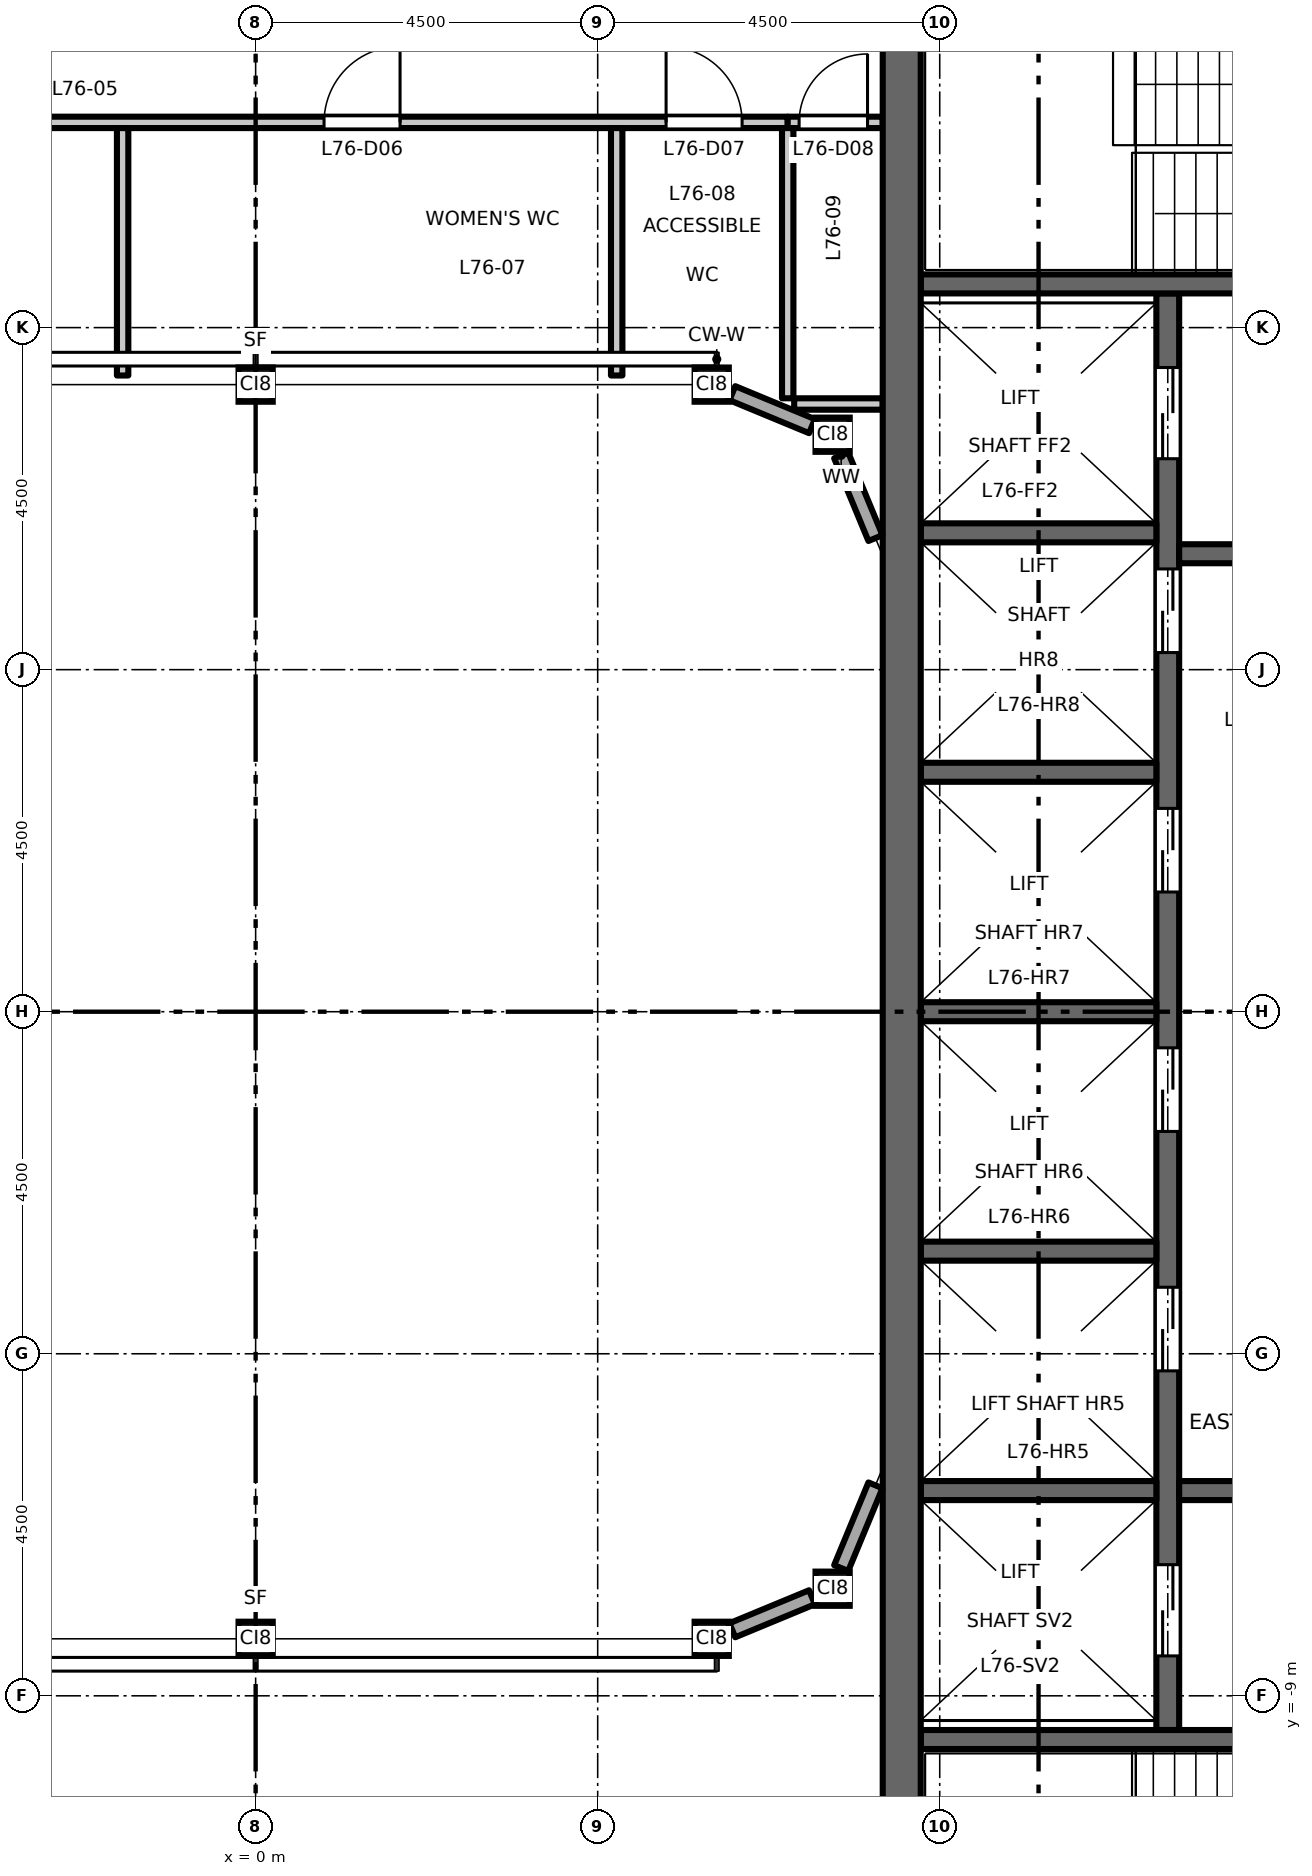
"""IFC4 building model, lengths in metres.
Left out: names, types, materials, properties, quantities, classifications, styles, units other than length and angle.
Written with IfcOpenShell. Run it as: python <this file> out.ifc"""

import sys

from ifc_helpers import new_model, si_unit, direction, frame, frame_2d, origin, origin_2d, place, context, subcontext, project, spatial, rectangle, hollow_rectangle, extrude, element, fill, save


model = new_model("IFC4")
c1 = context("Model", 3, precision=1e-05, world=origin(), true_north=direction((0.0, 1.0)))
c2 = subcontext(c1, "Body", "Model", "MODEL_VIEW")
j1 = project(units=[si_unit("LENGTHUNIT", "METRE"), si_unit("PLANEANGLEUNIT", "RADIAN")], contexts=[c1])
p1 = place(None, origin())
s1 = spatial("IfcSite", under=j1, at=p1, CompositionType="ELEMENT")
p2 = place(p1, origin())
s2 = spatial("IfcBuilding", under=s1, at=p2, CompositionType="ELEMENT")
p3 = place(p2, frame((0.0, 0.0, 353.2)))
s3 = spatial("IfcBuildingStorey", under=s2, at=p3, CompositionType="ELEMENT", Elevation=353.2)
for number, where, z_axis, x_axis in (
    (1, (0.0, -8.25, 0.0), (0.0, 0.0, 1.0), (1.0, 0.0, 0.0)),
    (2, (6.0, -8.25, 0.0), (0.0, 0.0, 1.0), (1.0, 0.0, 0.0)),
    (3, (7.591, -7.591, 0.0), (0.0, 0.0, 1.0), (1.0, 0.0, 0.0)),
    (4, (0.0, 8.25, 0.0), (0.0, 0.0, 1.0), (1.0, 0.0, 0.0)),
    (5, (6.0, 8.25, 0.0), (0.0, 0.0, 1.0), (1.0, 0.0, 0.0)),
    (6, (7.591, 7.591, 0.0), (0.0, 0.0, 1.0), (1.0, 0.0, 0.0)),
):
    element("IfcColumn", number, at=place(p3, frame(where, z_axis=z_axis, x_axis=x_axis)), inside=s3, PredefinedType="COLUMN", context=c2, shape_type="SweptSolid", body=[
        extrude(hollow_rectangle(XDim=0.45, YDim=0.45, WallThickness=0.022, at=origin_2d()), origin(), (0.0, 0.0, 1.0), 5.0),
    ])
p4 = place(p3, frame((12.0, -9.45, 0.0), z_axis=(0.0, 0.0, 1.0), x_axis=(0.0, 1.0, 0.0)))
e7 = element("IfcWall", 7, at=p4, inside=s3, PredefinedType="SHEAR", context=c2, shape_type="SweptSolid", body=[
    extrude(rectangle(XDim=18.9, YDim=0.3, at=frame_2d((9.45, 0.0))), origin(), (0.0, 0.0, 1.0), 4.8),
])
p5 = place(p4, frame((4.725, 0.0, 0.0)))
e8 = element("IfcOpeningElement", 8, at=p5, cuts=e7, PredefinedType="OPENING", context=c2, shape_type="SweptSolid", body=[
    extrude(rectangle(XDim=1.1, YDim=2.1, at=frame_2d((0.55, 1.05))), frame((0.0, 0.16, 0.0), z_axis=(0.0, -1.0, 0.0), x_axis=(1.0, 0.0, 0.0)), (0.0, 0.0, 1.0), 0.32),
])
p6 = place(p4, frame((7.875, 0.0, 0.0)))
e9 = element("IfcOpeningElement", 9, at=p6, cuts=e7, PredefinedType="OPENING", context=c2, shape_type="SweptSolid", body=[
    extrude(rectangle(XDim=1.1, YDim=2.1, at=frame_2d((0.55, 1.05))), frame((0.0, 0.16, 0.0), z_axis=(0.0, -1.0, 0.0), x_axis=(1.0, 0.0, 0.0)), (0.0, 0.0, 1.0), 0.32),
])
p7 = place(p4, frame((11.025, 0.0, 0.0)))
e10 = element("IfcOpeningElement", 10, at=p7, cuts=e7, PredefinedType="OPENING", context=c2, shape_type="SweptSolid", body=[
    extrude(rectangle(XDim=1.1, YDim=2.1, at=frame_2d((0.55, 1.05))), frame((0.0, 0.16, 0.0), z_axis=(0.0, -1.0, 0.0), x_axis=(1.0, 0.0, 0.0)), (0.0, 0.0, 1.0), 0.32),
])
p8 = place(p4, frame((14.175, 0.0, 0.0)))
e11 = element("IfcOpeningElement", 11, at=p8, cuts=e7, PredefinedType="OPENING", context=c2, shape_type="SweptSolid", body=[
    extrude(rectangle(XDim=1.1, YDim=2.1, at=frame_2d((0.55, 1.05))), frame((0.0, 0.16, 0.0), z_axis=(0.0, -1.0, 0.0), x_axis=(1.0, 0.0, 0.0)), (0.0, 0.0, 1.0), 0.32),
])
p9 = place(p4, frame((16.725, 0.0, 0.0)))
e12 = element("IfcOpeningElement", 12, at=p9, cuts=e7, PredefinedType="OPENING", context=c2, shape_type="SweptSolid", body=[
    extrude(rectangle(XDim=1.2, YDim=2.1, at=frame_2d((0.6, 1.05))), frame((0.0, 0.16, 0.0), z_axis=(0.0, -1.0, 0.0), x_axis=(1.0, 0.0, 0.0)), (0.0, 0.0, 1.0), 0.32),
])
p10 = place(p4, frame((0.975, 0.0, 0.0)))
e13 = element("IfcOpeningElement", 13, at=p10, cuts=e7, PredefinedType="OPENING", context=c2, shape_type="SweptSolid", body=[
    extrude(rectangle(XDim=1.2, YDim=2.1, at=frame_2d((0.6, 1.05))), frame((0.0, 0.16, 0.0), z_axis=(0.0, -1.0, 0.0), x_axis=(1.0, 0.0, 0.0)), (0.0, 0.0, 1.0), 0.32),
])
p11 = place(p3, frame((12.15, 6.025, 0.0), z_axis=(0.0, 0.0, 1.0), x_axis=(1.0, 0.0, 0.0)))
e14 = element("IfcWall", 14, at=p11, inside=s3, PredefinedType="SHEAR", context=c2, shape_type="SweptSolid", body=[
    extrude(rectangle(XDim=4.6, YDim=0.25, at=frame_2d((2.3, 0.0))), origin(), (0.0, 0.0, 1.0), 4.8),
])
p12 = place(p11, frame((1.8, 0.0, 0.0)))
e15 = element("IfcOpeningElement", 15, at=p12, cuts=e14, PredefinedType="OPENING", context=c2, shape_type="SweptSolid", body=[
    extrude(rectangle(XDim=1.0, YDim=2.1, at=frame_2d((0.5, 1.05))), frame((0.0, 0.135, 0.0), z_axis=(0.0, -1.0, 0.0), x_axis=(1.0, 0.0, 0.0)), (0.0, 0.0, 1.0), 0.27),
])
p13 = place(p3, frame((12.15, -6.3, 0.0), z_axis=(0.0, 0.0, 1.0), x_axis=(1.0, 0.0, 0.0)))
e16 = element("IfcWall", 16, at=p13, inside=s3, PredefinedType="SHEAR", context=c2, shape_type="SweptSolid", body=[
    extrude(rectangle(XDim=4.6, YDim=0.25, at=frame_2d((2.3, 0.0))), origin(), (0.0, 0.0, 1.0), 4.8),
])
p14 = place(p13, frame((1.8, 0.0, 0.0)))
e17 = element("IfcOpeningElement", 17, at=p14, cuts=e16, PredefinedType="OPENING", context=c2, shape_type="SweptSolid", body=[
    extrude(rectangle(XDim=1.0, YDim=2.1, at=frame_2d((0.5, 1.05))), frame((0.0, 0.135, 0.0), z_axis=(0.0, -1.0, 0.0), x_axis=(1.0, 0.0, 0.0)), (0.0, 0.0, 1.0), 0.27),
])
for number, where, z_axis, x_axis in (
    (18, (8.75, 0.0, 0.0), (0.0, 0.0, 1.0), (1.0, 0.0, 0.0)),
    (19, (8.75, 3.15, 0.0), (0.0, 0.0, 1.0), (1.0, 0.0, 0.0)),
    (20, (8.75, 6.3, 0.0), (0.0, 0.0, 1.0), (1.0, 0.0, 0.0)),
    (21, (8.75, -3.15, 0.0), (0.0, 0.0, 1.0), (1.0, 0.0, 0.0)),
    (22, (8.75, -6.3, 0.0), (0.0, 0.0, 1.0), (1.0, 0.0, 0.0)),
):
    element("IfcWall", number, at=place(p3, frame(where, z_axis=z_axis, x_axis=x_axis)), inside=s3, PredefinedType="SHEAR", context=c2, shape_type="SweptSolid", body=[
        extrude(rectangle(XDim=3.1, YDim=0.25, at=frame_2d((1.55, 0.0))), origin(), (0.0, 0.0, 1.0), 4.8),
    ])
p15 = place(p3, frame((8.75, 9.575, 0.0), z_axis=(0.0, 0.0, 1.0), x_axis=(1.0, 0.0, 0.0)))
e23 = element("IfcWall", 23, at=p15, inside=s3, PredefinedType="SHEAR", context=c2, shape_type="SweptSolid", body=[
    extrude(rectangle(XDim=8.0, YDim=0.25, at=frame_2d((4.0, 0.0))), origin(), (0.0, 0.0, 1.0), 4.8),
])
p16 = place(p15, frame((6.65, 0.0, 0.0)))
e24 = element("IfcOpeningElement", 24, at=p16, cuts=e23, PredefinedType="OPENING", context=c2, shape_type="SweptSolid", body=[
    extrude(rectangle(XDim=1.1, YDim=2.1, at=frame_2d((0.55, 1.05))), frame((0.0, 0.135, 0.0), z_axis=(0.0, -1.0, 0.0), x_axis=(1.0, 0.0, 0.0)), (0.0, 0.0, 1.0), 0.27),
])
p17 = place(p3, frame((8.75, -9.575, 0.0), z_axis=(0.0, 0.0, 1.0), x_axis=(1.0, 0.0, 0.0)))
e25 = element("IfcWall", 25, at=p17, inside=s3, PredefinedType="SHEAR", context=c2, shape_type="SweptSolid", body=[
    extrude(rectangle(XDim=8.0, YDim=0.25, at=frame_2d((4.0, 0.0))), origin(), (0.0, 0.0, 1.0), 4.8),
])
p18 = place(p17, frame((6.65, 0.0, 0.0)))
e26 = element("IfcOpeningElement", 26, at=p18, cuts=e25, PredefinedType="OPENING", context=c2, shape_type="SweptSolid", body=[
    extrude(rectangle(XDim=1.1, YDim=2.1, at=frame_2d((0.55, 1.05))), frame((0.0, 0.135, 0.0), z_axis=(0.0, -1.0, 0.0), x_axis=(1.0, 0.0, 0.0)), (0.0, 0.0, 1.0), 0.27),
])
p19 = place(p3, frame((8.5, -13.0, 0.0), z_axis=(0.0, 0.0, 1.0), x_axis=(0.0, 1.0, 0.0)))
e27 = element("IfcWall", 27, at=p19, inside=s3, PredefinedType="SHEAR", context=c2, shape_type="SweptSolid", body=[
    extrude(rectangle(XDim=26.0, YDim=0.5, at=frame_2d((13.0, 0.0))), origin(), (0.0, 0.0, 1.0), 4.8),
])
p20 = place(p3, frame((6.271, -8.137, 0.0), z_axis=(0.0, 0.0, 1.0), x_axis=(0.923864661962, 0.382719331074, 0.0)))
e28 = element("IfcWall", 28, at=p20, inside=s3, PredefinedType="STANDARD", context=c2, shape_type="SweptSolid", body=[
    extrude(rectangle(XDim=1.134, YDim=0.2, at=frame_2d((0.567, 0.0))), origin(), (0.0, 0.0, 1.0), 4.46),
])
for number, where, z_axis, x_axis in (
    (29, (7.703, -7.319, 0.0), (0.0, 0.0, 1.0), (0.383, 0.924, 0.0)),
    (30, (8.154, 6.231, 0.0), (0.0, 0.0, 1.0), (-0.383, 0.924, 0.0)),
):
    element("IfcWall", number, at=place(p3, frame(where, z_axis=z_axis, x_axis=x_axis)), inside=s3, PredefinedType="STANDARD", context=c2, shape_type="SweptSolid", body=[
        extrude(rectangle(XDim=1.178, YDim=0.2, at=frame_2d((0.589, 0.0))), origin(), (0.0, 0.0, 1.0), 4.46),
    ])
p21 = place(p3, frame((7.319, 7.703, 0.0), z_axis=(0.0, 0.0, 1.0), x_axis=(-0.923864661962, 0.382719331074, 0.0)))
e31 = element("IfcWall", 31, at=p21, inside=s3, PredefinedType="STANDARD", context=c2, shape_type="SweptSolid", body=[
    extrude(rectangle(XDim=1.134, YDim=0.2, at=frame_2d((0.567, 0.0))), origin(), (0.0, 0.0, 1.0), 4.46),
])
p22 = place(p3, frame((7.085, 7.995, 0.0), z_axis=(0.0, 0.0, 1.0), x_axis=(1.0, 0.0, 0.0)))
e32 = element("IfcWall", 32, at=p22, inside=s3, PredefinedType="PARTITIONING", context=c2, shape_type="SweptSolid", body=[
    extrude(rectangle(XDim=1.165, YDim=0.15, at=frame_2d((0.583, 0.0))), origin(), (0.0, 0.0, 1.0), 4.8),
])
p23 = place(p3, frame((-8.25, 11.7, 0.0), z_axis=(0.0, 0.0, 1.0), x_axis=(1.0, 0.0, 0.0)))
e33 = element("IfcWall", 33, at=p23, inside=s3, PredefinedType="PARTITIONING", context=c2, shape_type="SweptSolid", body=[
    extrude(rectangle(XDim=15.25, YDim=0.15, at=frame_2d((7.625, 0.0))), origin(), (0.0, 0.0, 1.0), 4.8),
])
p24 = place(p23, frame((2.65, 0.0, 0.0)))
e34 = element("IfcOpeningElement", 34, at=p24, cuts=e33, PredefinedType="OPENING", context=c2, shape_type="SweptSolid", body=[
    extrude(rectangle(XDim=1.0, YDim=2.1, at=frame_2d((0.5, 1.05))), frame((0.0, 0.085, 0.0), z_axis=(0.0, -1.0, 0.0), x_axis=(1.0, 0.0, 0.0)), (0.0, 0.0, 1.0), 0.17),
])
p25 = place(p23, frame((9.15, 0.0, 0.0)))
e35 = element("IfcOpeningElement", 35, at=p25, cuts=e33, PredefinedType="OPENING", context=c2, shape_type="SweptSolid", body=[
    extrude(rectangle(XDim=1.0, YDim=2.1, at=frame_2d((0.5, 1.05))), frame((0.0, 0.085, 0.0), z_axis=(0.0, -1.0, 0.0), x_axis=(1.0, 0.0, 0.0)), (0.0, 0.0, 1.0), 0.17),
])
p26 = place(p23, frame((13.65, 0.0, 0.0)))
e36 = element("IfcOpeningElement", 36, at=p26, cuts=e33, PredefinedType="OPENING", context=c2, shape_type="SweptSolid", body=[
    extrude(rectangle(XDim=1.0, YDim=2.1, at=frame_2d((0.5, 1.05))), frame((0.0, 0.085, 0.0), z_axis=(0.0, -1.0, 0.0), x_axis=(1.0, 0.0, 0.0)), (0.0, 0.0, 1.0), 0.17),
])
p27 = place(p3, frame((7.0, 11.7, 0.0), z_axis=(0.0, 0.0, 1.0), x_axis=(1.0, 0.0, 0.0)))
e37 = element("IfcWall", 37, at=p27, inside=s3, PredefinedType="PARTITIONING", context=c2, shape_type="SweptSolid", body=[
    extrude(rectangle(XDim=1.25, YDim=0.15, at=frame_2d((0.625, 0.0))), origin(), (0.0, 0.0, 1.0), 4.8),
])
p28 = place(p27, frame((0.15, 0.0, 0.0)))
e38 = element("IfcOpeningElement", 38, at=p28, cuts=e37, PredefinedType="OPENING", context=c2, shape_type="SweptSolid", body=[
    extrude(rectangle(XDim=0.9, YDim=2.1, at=frame_2d((0.45, 1.05))), frame((0.0, 0.085, 0.0), z_axis=(0.0, -1.0, 0.0), x_axis=(1.0, 0.0, 0.0)), (0.0, 0.0, 1.0), 0.17),
])
for number, where, z_axis, x_axis in (
    (39, (-1.75, 8.37, 0.0), (0.0, 0.0, 1.0), (0.0, 1.0, 0.0)),
    (40, (4.75, 8.37, 0.0), (0.0, 0.0, 1.0), (0.0, 1.0, 0.0)),
):
    element("IfcWall", number, at=place(p3, frame(where, z_axis=z_axis, x_axis=x_axis)), inside=s3, PredefinedType="PARTITIONING", context=c2, shape_type="SweptSolid", body=[
        extrude(rectangle(XDim=3.255, YDim=0.15, at=frame_2d((1.627, 0.0))), origin(), (0.0, 0.0, 1.0), 4.8),
    ])
p29 = place(p3, frame((7.0, 8.07, 0.0), z_axis=(0.0, 0.0, 1.0), x_axis=(0.0, 1.0, 0.0)))
e41 = element("IfcWall", 41, at=p29, inside=s3, PredefinedType="PARTITIONING", context=c2, shape_type="SweptSolid", body=[
    extrude(rectangle(XDim=3.555, YDim=0.15, at=frame_2d((1.777, 0.0))), origin(), (0.0, 0.0, 1.0), 4.8),
])
p30 = place(p5, origin())
e42 = element("IfcDoor", 42, at=p30, inside=s3, OperationType="DOUBLE_DOOR_SLIDING", PredefinedType="DOOR", context=c2, shape_type="SweptSolid", body=[
    extrude(rectangle(XDim=1.1, YDim=2.1, at=frame_2d((0.55, 1.05))), frame((0.0, 0.025, 0.0), z_axis=(0.0, -1.0, 0.0), x_axis=(1.0, 0.0, 0.0)), (0.0, 0.0, 1.0), 0.05),
])
fill(e8, e42)
p31 = place(p6, origin())
e43 = element("IfcDoor", 43, at=p31, inside=s3, OperationType="DOUBLE_DOOR_SLIDING", PredefinedType="DOOR", context=c2, shape_type="SweptSolid", body=[
    extrude(rectangle(XDim=1.1, YDim=2.1, at=frame_2d((0.55, 1.05))), frame((0.0, 0.025, 0.0), z_axis=(0.0, -1.0, 0.0), x_axis=(1.0, 0.0, 0.0)), (0.0, 0.0, 1.0), 0.05),
])
fill(e9, e43)
p32 = place(p7, origin())
e44 = element("IfcDoor", 44, at=p32, inside=s3, OperationType="DOUBLE_DOOR_SLIDING", PredefinedType="DOOR", context=c2, shape_type="SweptSolid", body=[
    extrude(rectangle(XDim=1.1, YDim=2.1, at=frame_2d((0.55, 1.05))), frame((0.0, 0.025, 0.0), z_axis=(0.0, -1.0, 0.0), x_axis=(1.0, 0.0, 0.0)), (0.0, 0.0, 1.0), 0.05),
])
fill(e10, e44)
p33 = place(p8, origin())
e45 = element("IfcDoor", 45, at=p33, inside=s3, OperationType="DOUBLE_DOOR_SLIDING", PredefinedType="DOOR", context=c2, shape_type="SweptSolid", body=[
    extrude(rectangle(XDim=1.1, YDim=2.1, at=frame_2d((0.55, 1.05))), frame((0.0, 0.025, 0.0), z_axis=(0.0, -1.0, 0.0), x_axis=(1.0, 0.0, 0.0)), (0.0, 0.0, 1.0), 0.05),
])
fill(e11, e45)
p34 = place(p9, origin())
e46 = element("IfcDoor", 46, at=p34, inside=s3, OperationType="DOUBLE_DOOR_SLIDING", PredefinedType="DOOR", context=c2, shape_type="SweptSolid", body=[
    extrude(rectangle(XDim=1.2, YDim=2.1, at=frame_2d((0.6, 1.05))), frame((0.0, 0.025, 0.0), z_axis=(0.0, -1.0, 0.0), x_axis=(1.0, 0.0, 0.0)), (0.0, 0.0, 1.0), 0.05),
])
fill(e12, e46)
p35 = place(p10, origin())
e47 = element("IfcDoor", 47, at=p35, inside=s3, OperationType="DOUBLE_DOOR_SLIDING", PredefinedType="DOOR", context=c2, shape_type="SweptSolid", body=[
    extrude(rectangle(XDim=1.2, YDim=2.1, at=frame_2d((0.6, 1.05))), frame((0.0, 0.025, 0.0), z_axis=(0.0, -1.0, 0.0), x_axis=(1.0, 0.0, 0.0)), (0.0, 0.0, 1.0), 0.05),
])
fill(e13, e47)
p36 = place(p25, origin())
e48 = element("IfcDoor", 48, at=p36, inside=s3, OperationType="SINGLE_SWING_RIGHT", PredefinedType="DOOR", context=c2, shape_type="SweptSolid", body=[
    extrude(rectangle(XDim=1.0, YDim=2.1, at=frame_2d((0.5, 1.05))), frame((0.0, 0.025, 0.0), z_axis=(0.0, -1.0, 0.0), x_axis=(1.0, 0.0, 0.0)), (0.0, 0.0, 1.0), 0.05),
])
fill(e35, e48)
p37 = place(p26, origin())
e49 = element("IfcDoor", 49, at=p37, inside=s3, OperationType="SINGLE_SWING_LEFT", PredefinedType="DOOR", context=c2, shape_type="SweptSolid", body=[
    extrude(rectangle(XDim=1.0, YDim=2.1, at=frame_2d((0.5, 1.05))), frame((0.0, 0.025, 0.0), z_axis=(0.0, -1.0, 0.0), x_axis=(1.0, 0.0, 0.0)), (0.0, 0.0, 1.0), 0.05),
])
fill(e36, e49)
p38 = place(p28, origin())
e50 = element("IfcDoor", 50, at=p38, inside=s3, OperationType="SINGLE_SWING_RIGHT", PredefinedType="DOOR", context=c2, shape_type="SweptSolid", body=[
    extrude(rectangle(XDim=0.9, YDim=2.1, at=frame_2d((0.45, 1.05))), frame((0.0, 0.025, 0.0), z_axis=(0.0, -1.0, 0.0), x_axis=(1.0, 0.0, 0.0)), (0.0, 0.0, 1.0), 0.05),
])
fill(e38, e50)
save(model, sys.argv[1])
